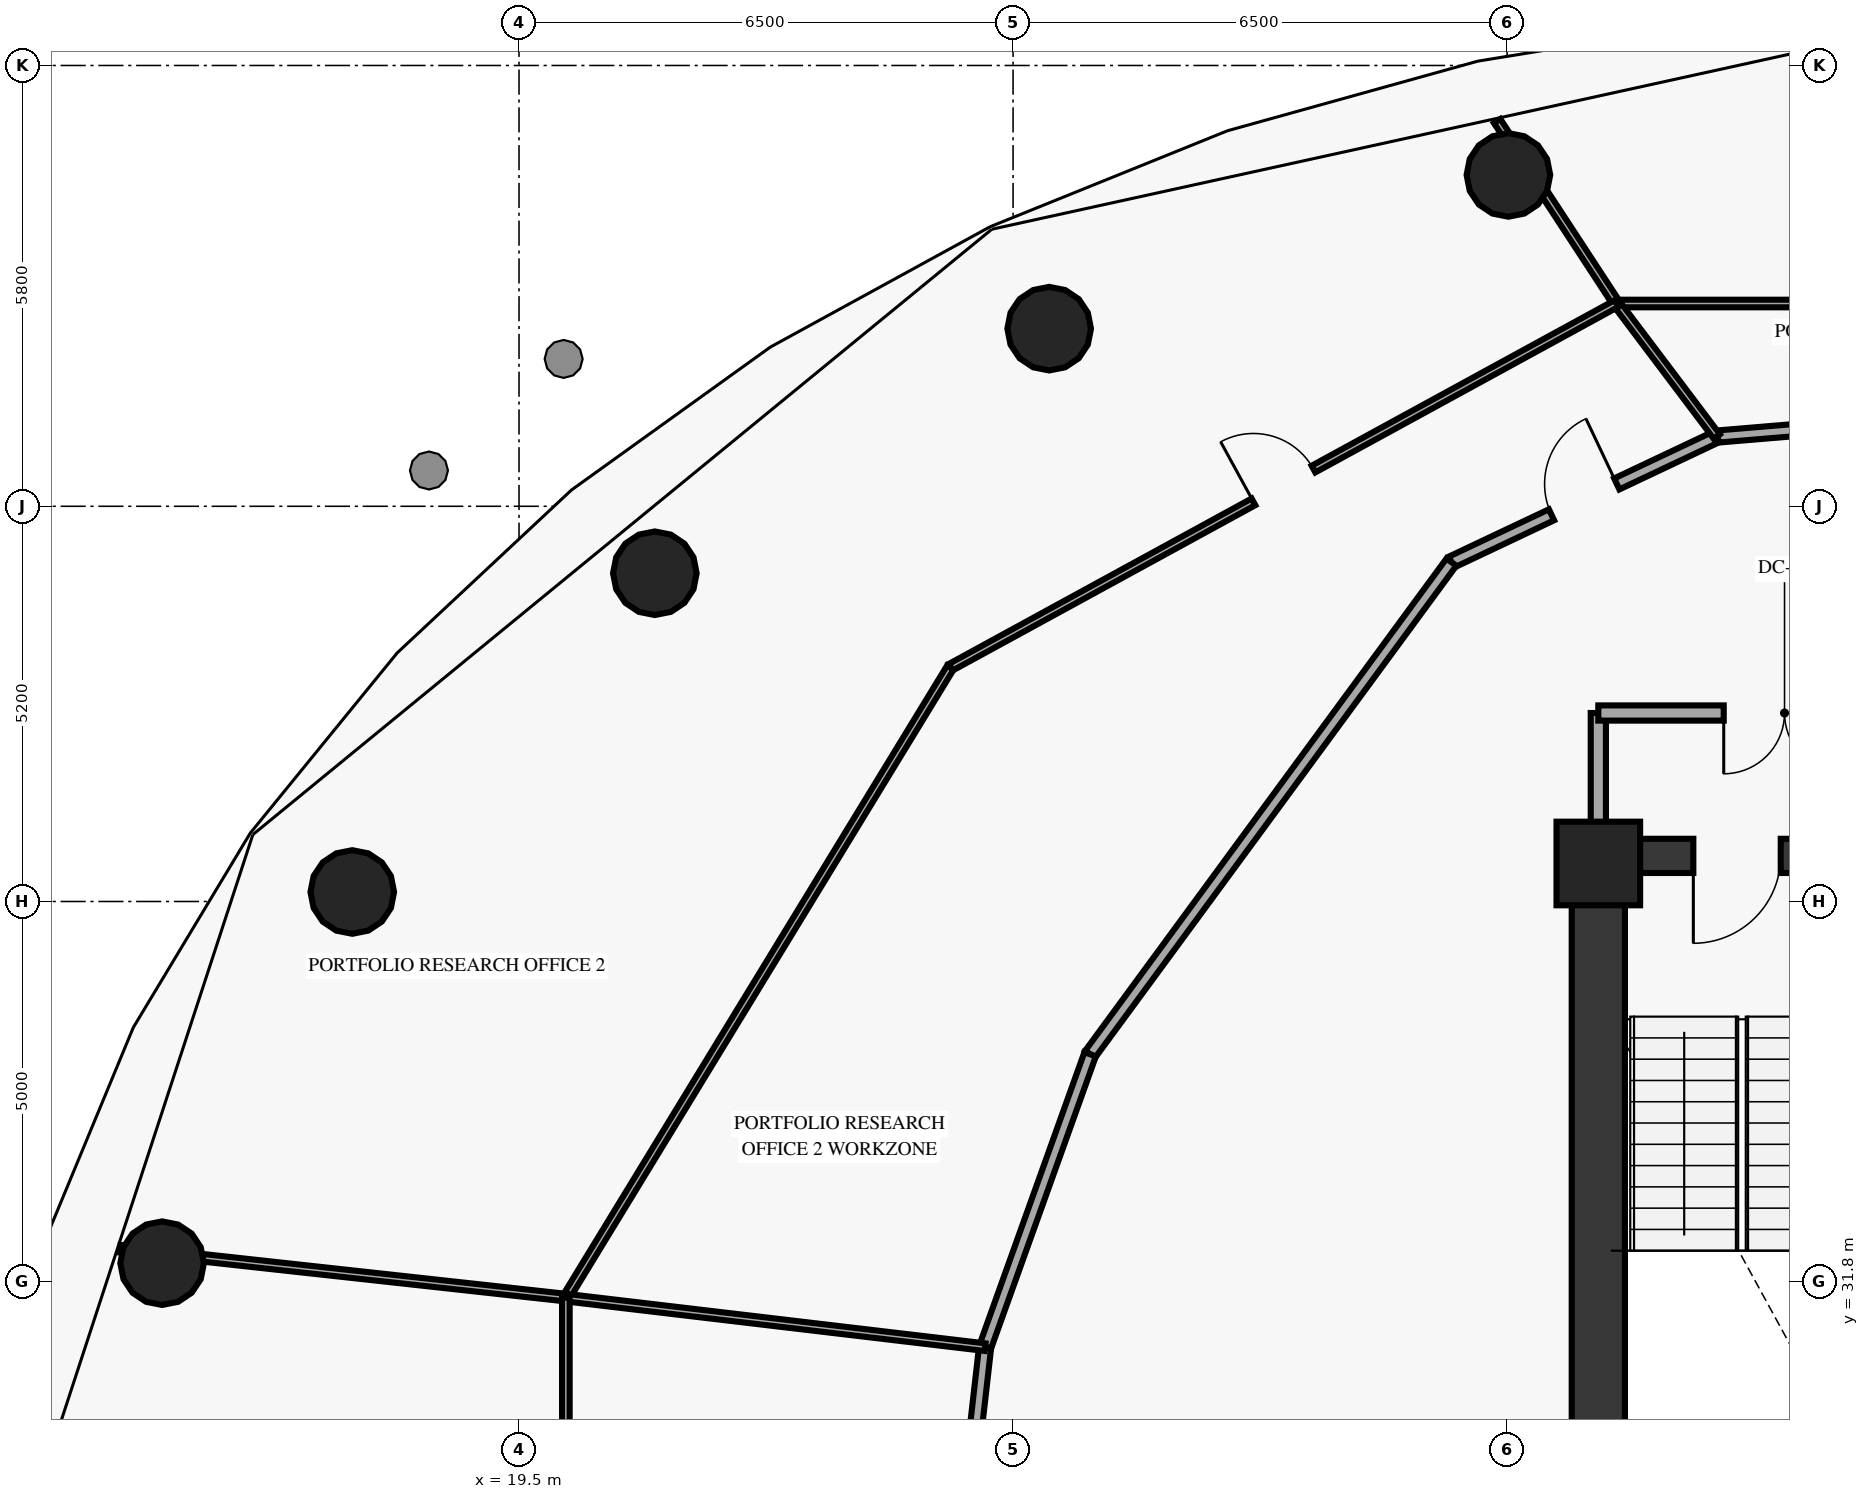
"""IFC4 building model, lengths in metres.
Left out: names, types, materials, properties, quantities, classifications, styles, units other than length and angle.
Written with IfcOpenShell. Run it as: python <this file> out.ifc"""

import sys

from ifc_helpers import new_model, si_unit, direction, frame, frame_2d, origin, origin_2d, place, context, subcontext, project, spatial, rectangle, circle, extrude, element, fill, save


model = new_model("IFC4")
c1 = context("Model", 3, precision=1e-05, world=origin(), true_north=direction((0.0, 1.0)))
c2 = subcontext(c1, "Body", "Model", "MODEL_VIEW")
j1 = project(units=[si_unit("LENGTHUNIT", "METRE"), si_unit("PLANEANGLEUNIT", "RADIAN")], contexts=[c1])
p1 = place(None, origin())
s1 = spatial("IfcSite", under=j1, at=p1, CompositionType="ELEMENT")
p2 = place(p1, origin())
s2 = spatial("IfcBuilding", under=s1, at=p2, CompositionType="ELEMENT")
p3 = place(p2, frame((0.0, 0.0, 65.55)))
s3 = spatial("IfcBuildingStorey", under=s2, at=p3, CompositionType="ELEMENT", Elevation=65.55)
p4 = place(p3, frame((33.7, 37.3, 0.0), z_axis=(0.0, 0.0, 1.0), x_axis=(1.0, 0.0, 0.0)))
e1 = element("IfcColumn", 1, at=p4, inside=s3, PredefinedType="PILASTER", context=c2, shape_type="SweptSolid", body=[
    extrude(rectangle(XDim=1.1, YDim=1.1, at=origin_2d()), origin(), (0.0, 0.0, 1.0), 3.8),
])
for number, where, z_axis, x_axis in (
    (2, (32.517, 46.36, 0.0), (0.0, 0.0, 1.0), (1.0, 0.0, 0.0)),
    (3, (26.475, 44.337, 0.0), (0.0, 0.0, 1.0), (1.0, 0.0, 0.0)),
    (4, (21.287, 41.119, 0.0), (0.0, 0.0, 1.0), (1.0, 0.0, 0.0)),
    (5, (17.306, 36.925, 0.0), (0.0, 0.0, 1.0), (1.0, 0.0, 0.0)),
    (6, (14.804, 32.041, 0.0), (0.0, 0.0, 1.0), (1.0, 0.0, 0.0)),
):
    element("IfcColumn", number, at=place(p3, frame(where, z_axis=z_axis, x_axis=x_axis)), inside=s3, PredefinedType="COLUMN", context=c2, shape_type="SweptSolid", body=[
        extrude(circle(Radius=0.55, at=origin_2d()), origin(), (0.0, 0.0, 1.0), 3.8),
    ])
p5 = place(p3, frame((33.7, 29.05, 0.0), z_axis=(0.0, 0.0, 1.0), x_axis=(0.0, 1.0, 0.0)))
e7 = element("IfcWall", 7, at=p5, inside=s3, PredefinedType="SHEAR", context=c2, shape_type="SweptSolid", body=[
    extrude(rectangle(XDim=8.35, YDim=0.7, at=frame_2d((4.175, 0.0))), origin(), (0.0, 0.0, 1.0), 3.8),
])
p6 = place(p3, frame((37.35, 37.4, 0.0), z_axis=(0.0, 0.0, 1.0), x_axis=(-1.0, 0.0, 0.0)))
e8 = element("IfcWall", 8, at=p6, inside=s3, PredefinedType="SHEAR", context=c2, shape_type="SweptSolid", body=[
    extrude(rectangle(XDim=3.65, YDim=0.45, at=frame_2d((1.825, 0.0))), origin(), (0.0, 0.0, 1.0), 3.8),
])
p7 = place(p6, frame((1.25, 0.0, 0.0)))
e9 = element("IfcOpeningElement", 9, at=p7, cuts=e8, PredefinedType="OPENING", context=c2, shape_type="SweptSolid", body=[
    extrude(rectangle(XDim=1.15, YDim=2.15, at=frame_2d((0.575, 1.075))), frame((0.0, 0.235, 0.0), z_axis=(0.0, -1.0, 0.0), x_axis=(1.0, 0.0, 0.0)), (0.0, 0.0, 1.0), 0.47),
])
p8 = place(p3, frame((33.7, 37.4, 0.0), z_axis=(0.0, 0.0, 1.0), x_axis=(0.0, 1.0, 0.0)))
e10 = element("IfcWall", 10, at=p8, inside=s3, PredefinedType="SOLIDWALL", context=c2, shape_type="SweptSolid", body=[
    extrude(rectangle(XDim=1.88, YDim=0.2, at=frame_2d((0.94, 0.0))), origin(), (0.0, 0.0, 1.0), 3.8),
])
p9 = place(p3, frame((38.9, 39.28, 0.0), z_axis=(0.0, 0.0, 1.0), x_axis=(-1.0, 0.0, 0.0)))
e11 = element("IfcWall", 11, at=p9, inside=s3, PredefinedType="SOLIDWALL", context=c2, shape_type="SweptSolid", body=[
    extrude(rectangle(XDim=5.2, YDim=0.2, at=frame_2d((2.6, 0.0))), origin(), (0.0, 0.0, 1.0), 3.8),
])
p10 = place(p9, frame((1.95, 0.0, 0.0)))
e12 = element("IfcOpeningElement", 12, at=p10, cuts=e11, PredefinedType="OPENING", context=c2, shape_type="SweptSolid", body=[
    extrude(rectangle(XDim=1.6, YDim=2.2, at=frame_2d((0.8, 1.1))), frame((0.0, 0.11, 0.0), z_axis=(0.0, -1.0, 0.0), x_axis=(1.0, 0.0, 0.0)), (0.0, 0.0, 1.0), 0.22),
])
p11 = place(p3, frame((39.0, 43.23, 0.0), z_axis=(0.0, 0.0, 1.0), x_axis=(-0.996516536006, -0.083395404345, 0.0)))
e13 = element("IfcWall", 13, at=p11, inside=s3, PredefinedType="PARTITIONING", context=c2, shape_type="SweptSolid", body=[
    extrude(rectangle(XDim=3.753, YDim=0.16, at=frame_2d((1.876, 0.0))), origin(), (0.0, 0.0, 1.0), 3.8),
])
p12 = place(p3, frame((31.767, 41.265, 0.0), z_axis=(0.0, 0.0, 1.0), x_axis=(0.90398213878, 0.427570219691, 0.0)))
e14 = element("IfcWall", 14, at=p12, inside=s3, PredefinedType="PARTITIONING", context=c2, shape_type="SweptSolid", body=[
    extrude(rectangle(XDim=3.864, YDim=0.16, at=frame_2d((1.932, 0.0))), origin(), (0.0, 0.0, 1.0), 3.8),
])
p13 = place(p12, frame((1.457, 0.0, 0.0)))
e15 = element("IfcOpeningElement", 15, at=p13, cuts=e14, PredefinedType="OPENING", context=c2, shape_type="SweptSolid", body=[
    extrude(rectangle(XDim=0.95, YDim=2.15, at=frame_2d((0.475, 1.075))), frame((0.0, 0.09, 0.0), z_axis=(0.0, -1.0, 0.0), x_axis=(1.0, 0.0, 0.0)), (0.0, 0.0, 1.0), 0.18),
])
p14 = place(p3, frame((31.767, 41.265, 0.0), z_axis=(0.0, 0.0, 1.0), x_axis=(-0.59176417482, -0.806111134645, 0.0)))
e16 = element("IfcWall", 16, at=p14, inside=s3, PredefinedType="PARTITIONING", context=c2, shape_type="SweptSolid", body=[
    extrude(rectangle(XDim=8.032, YDim=0.16, at=frame_2d((4.016, 0.0))), origin(), (0.0, 0.0, 1.0), 3.8),
])
p15 = place(p3, frame((27.014, 34.79, 0.0), z_axis=(0.0, 0.0, 1.0), x_axis=(-0.337507156162, -0.941322962399, 0.0)))
e17 = element("IfcWall", 17, at=p15, inside=s3, PredefinedType="PARTITIONING", context=c2, shape_type="SweptSolid", body=[
    extrude(rectangle(XDim=4.094, YDim=0.16, at=frame_2d((2.047, 0.0))), origin(), (0.0, 0.0, 1.0), 3.8),
])
p16 = place(p3, frame((25.16, 26.8, 0.0), z_axis=(0.0, 0.0, 1.0), x_axis=(0.113424191486, 0.993546653553, 0.0)))
e18 = element("IfcWall", 18, at=p16, inside=s3, PredefinedType="PARTITIONING", context=c2, shape_type="SweptSolid", body=[
    extrude(rectangle(XDim=4.163, YDim=0.16, at=frame_2d((2.082, 0.0))), origin(), (0.0, 0.0, 1.0), 3.8),
])
p17 = place(p16, frame((1.606, 0.0, 0.0)))
e19 = element("IfcOpeningElement", 19, at=p17, cuts=e18, PredefinedType="OPENING", context=c2, shape_type="SweptSolid", body=[
    extrude(rectangle(XDim=0.95, YDim=2.15, at=frame_2d((0.475, 1.075))), frame((0.0, 0.09, 0.0), z_axis=(0.0, -1.0, 0.0), x_axis=(1.0, 0.0, 0.0)), (0.0, 0.0, 1.0), 0.18),
])
p18 = place(p3, frame((44.06, 44.668, 0.0), z_axis=(0.0, 0.0, 1.0), x_axis=(-1.0, 0.0, 0.0)))
e20 = element("IfcWall", 20, at=p18, inside=s3, PredefinedType="MOVABLE", context=c2, shape_type="SweptSolid", body=[
    extrude(rectangle(XDim=10.12, YDim=0.1, at=frame_2d((5.06, 0.0))), origin(), (0.0, 0.0, 1.0), 3.8),
])
p19 = place(p3, frame((35.26, 42.917, 0.0), z_axis=(0.0, 0.0, 1.0), x_axis=(-0.601993273634, 0.798501157482, 0.0)))
e21 = element("IfcWall", 21, at=p19, inside=s3, PredefinedType="MOVABLE", context=c2, shape_type="SweptSolid", body=[
    extrude(rectangle(XDim=2.193, YDim=0.1, at=frame_2d((1.096, 0.0))), origin(), (0.0, 0.0, 1.0), 3.8),
])
p20 = place(p3, frame((33.94, 44.668, 0.0), z_axis=(0.0, 0.0, 1.0), x_axis=(-0.54751296274, 0.836797201018, 0.0)))
e22 = element("IfcWall", 22, at=p20, inside=s3, PredefinedType="MOVABLE", context=c2, shape_type="SweptSolid", body=[
    extrude(rectangle(XDim=2.869, YDim=0.1, at=frame_2d((1.435, 0.0))), origin(), (0.0, 0.0, 1.0), 3.8),
])
p21 = place(p3, frame((25.176, 39.88, 0.0), z_axis=(0.0, 0.0, 1.0), x_axis=(0.877568372218, 0.479451511712, 0.0)))
e23 = element("IfcWall", 23, at=p21, inside=s3, PredefinedType="MOVABLE", context=c2, shape_type="SweptSolid", body=[
    extrude(rectangle(XDim=9.987, YDim=0.1, at=frame_2d((4.993, 0.0))), origin(), (0.0, 0.0, 1.0), 3.8),
])
p22 = place(p21, frame((4.543, 0.0, 0.0)))
e24 = element("IfcOpeningElement", 24, at=p22, cuts=e23, PredefinedType="OPENING", context=c2, shape_type="SweptSolid", body=[
    extrude(rectangle(XDim=0.9, YDim=2.1, at=frame_2d((0.45, 1.05))), frame((0.0, 0.06, 0.0), z_axis=(0.0, -1.0, 0.0), x_axis=(1.0, 0.0, 0.0)), (0.0, 0.0, 1.0), 0.12),
])
p23 = place(p3, frame((25.176, 39.88, 0.0), z_axis=(0.0, 0.0, 1.0), x_axis=(-0.520904998728, -0.853614656798, 0.0)))
e25 = element("IfcWall", 25, at=p23, inside=s3, PredefinedType="MOVABLE", context=c2, shape_type="SweptSolid", body=[
    extrude(rectangle(XDim=9.714, YDim=0.1, at=frame_2d((4.857, 0.0))), origin(), (0.0, 0.0, 1.0), 3.8),
])
p24 = place(p3, frame((25.632, 30.936, 0.0), z_axis=(0.0, 0.0, 1.0), x_axis=(-0.993089865622, 0.117356375197, 0.0)))
e26 = element("IfcWall", 26, at=p24, inside=s3, PredefinedType="MOVABLE", context=c2, shape_type="SweptSolid", body=[
    extrude(rectangle(XDim=5.554, YDim=0.1, at=frame_2d((2.777, 0.0))), origin(), (0.0, 0.0, 1.0), 3.8),
])
p25 = place(p3, frame((20.116, 31.588, 0.0), z_axis=(0.0, 0.0, 1.0), x_axis=(-0.994040689629, 0.109009666368, 0.0)))
e27 = element("IfcWall", 27, at=p25, inside=s3, PredefinedType="MOVABLE", context=c2, shape_type="SweptSolid", body=[
    extrude(rectangle(XDim=5.899, YDim=0.1, at=frame_2d((2.95, 0.0))), origin(), (0.0, 0.0, 1.0), 3.8),
])
p26 = place(p3, frame((20.116, 22.012, 0.0), z_axis=(0.0, 0.0, 1.0), x_axis=(0.0, 1.0, 0.0)))
e28 = element("IfcWall", 28, at=p26, inside=s3, PredefinedType="MOVABLE", context=c2, shape_type="SweptSolid", body=[
    extrude(rectangle(XDim=9.576, YDim=0.1, at=frame_2d((4.788, 0.0))), origin(), (0.0, 0.0, 1.0), 3.8),
])
p27 = place(p26, frame((4.338, 0.0, 0.0)))
e29 = element("IfcOpeningElement", 29, at=p27, cuts=e28, PredefinedType="OPENING", context=c2, shape_type="SweptSolid", body=[
    extrude(rectangle(XDim=0.9, YDim=2.1, at=frame_2d((0.45, 1.05))), frame((0.0, 0.06, 0.0), z_axis=(0.0, -1.0, 0.0), x_axis=(1.0, 0.0, 0.0)), (0.0, 0.0, 1.0), 0.12),
])
p28 = place(p7, origin())
e30 = element("IfcDoor", 30, at=p28, inside=s3, OperationType="SINGLE_SWING_RIGHT", PredefinedType="DOOR", context=c2, shape_type="SweptSolid", body=[
    extrude(rectangle(XDim=1.15, YDim=2.15, at=frame_2d((0.575, 1.075))), frame((0.0, 0.025, 0.0), z_axis=(0.0, -1.0, 0.0), x_axis=(1.0, 0.0, 0.0)), (0.0, 0.0, 1.0), 0.05),
])
fill(e9, e30)
p29 = place(p10, origin())
e31 = element("IfcDoor", 31, at=p29, inside=s3, OperationType="DOUBLE_DOOR_SINGLE_SWING", PredefinedType="DOOR", context=c2, shape_type="SweptSolid", body=[
    extrude(rectangle(XDim=1.6, YDim=2.2, at=frame_2d((0.8, 1.1))), frame((0.0, 0.025, 0.0), z_axis=(0.0, -1.0, 0.0), x_axis=(1.0, 0.0, 0.0)), (0.0, 0.0, 1.0), 0.05),
])
fill(e12, e31)
p30 = place(p13, origin())
e32 = element("IfcDoor", 32, at=p30, inside=s3, OperationType="SINGLE_SWING_RIGHT", PredefinedType="DOOR", context=c2, shape_type="SweptSolid", body=[
    extrude(rectangle(XDim=0.95, YDim=2.15, at=frame_2d((0.475, 1.075))), frame((0.0, 0.025, 0.0), z_axis=(0.0, -1.0, 0.0), x_axis=(1.0, 0.0, 0.0)), (0.0, 0.0, 1.0), 0.05),
])
fill(e15, e32)
p31 = place(p22, origin())
e33 = element("IfcDoor", 33, at=p31, inside=s3, OperationType="SINGLE_SWING_LEFT", PredefinedType="DOOR", context=c2, shape_type="SweptSolid", body=[
    extrude(rectangle(XDim=0.9, YDim=2.1, at=frame_2d((0.45, 1.05))), frame((0.0, 0.025, 0.0), z_axis=(0.0, -1.0, 0.0), x_axis=(1.0, 0.0, 0.0)), (0.0, 0.0, 1.0), 0.05),
])
fill(e24, e33)
save(model, sys.argv[1])
